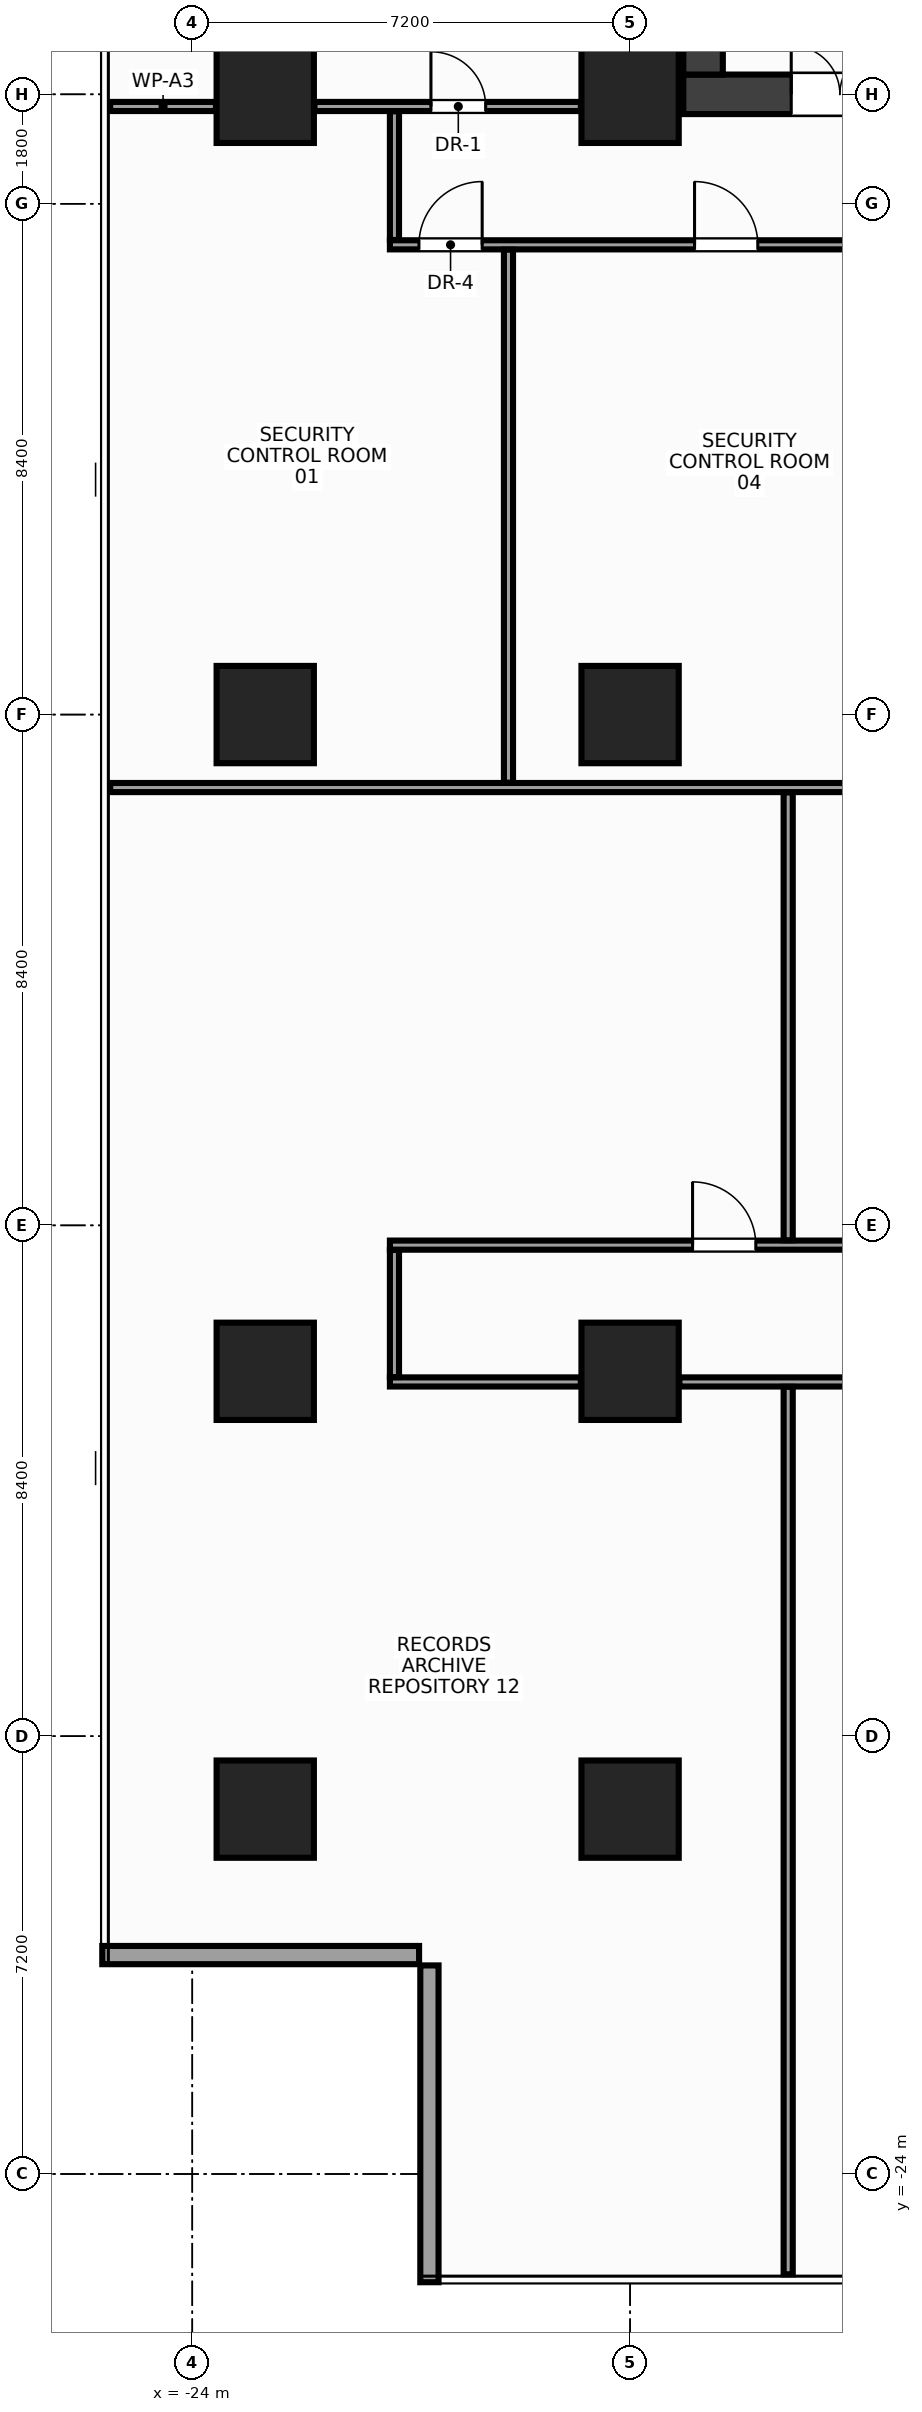
"""IFC4 building model, lengths in metres.
Left out: names, types, materials, properties, quantities, classifications, styles, units other than length and angle.
Written with IfcOpenShell. Run it as: python <this file> out.ifc"""

import sys

from ifc_helpers import new_model, si_unit, direction, frame, frame_2d, origin, origin_2d, place, context, subcontext, project, spatial, rectangle, extrude, source, transform, mapped, element, fill, save


model = new_model("IFC4")
c1 = context("Model", 3, precision=1e-05, world=origin(), true_north=direction((0.0, 1.0)))
c2 = subcontext(c1, "Body", "Model", "MODEL_VIEW")
j1 = project(units=[si_unit("LENGTHUNIT", "METRE"), si_unit("PLANEANGLEUNIT", "RADIAN")], contexts=[c1])
p1 = place(None, origin())
s1 = spatial("IfcSite", under=j1, at=p1, CompositionType="ELEMENT")
p2 = place(p1, origin())
s2 = spatial("IfcBuilding", under=s1, at=p2, CompositionType="ELEMENT")
p3 = place(p2, frame((0.0, 0.0, 95.6)))
s3 = spatial("IfcBuildingStorey", under=s2, at=p3, CompositionType="ELEMENT", Elevation=95.6)
m1 = source(origin(), c2, "Body", "SweptSolid", [
    extrude(rectangle(XDim=31.85, YDim=0.65, at=frame_2d((15.925, 0.0))), origin(), (0.0, 0.0, 1.0), 3.6),
])
p4 = place(p3, frame((-15.925, 10.2, 0.0), z_axis=(0.0, 0.0, 1.0), x_axis=(1.0, 0.0, 0.0)))
e1 = element("IfcWall", 1, at=p4, inside=s3, PredefinedType="SHEAR", context=c2, shape_type="MappedRepresentation", body=[
    mapped(m1, transform((0.0, 0.0, 0.0), x_axis=(1.0, 0.0, 0.0), y_axis=(0.0, 1.0, 0.0), z_axis=(0.0, 0.0, 1.0), scale=1.0)),
])
p5 = place(p4, frame((1.775, 0.0, 0.0)))
e2 = element("IfcOpeningElement", 2, at=p5, cuts=e1, PredefinedType="OPENING", context=c2, shape_type="SweptSolid", body=[
    extrude(rectangle(XDim=1.6, YDim=2.15, at=frame_2d((0.8, 1.075))), frame((0.0, 0.337, 0.0), z_axis=(0.0, -1.0, 0.0), x_axis=(1.0, 0.0, 0.0)), (0.0, 0.0, 1.0), 0.674),
])
p6 = place(p4, frame((28.475, 0.0, 0.0)))
e3 = element("IfcOpeningElement", 3, at=p6, cuts=e1, PredefinedType="OPENING", context=c2, shape_type="SweptSolid", body=[
    extrude(rectangle(XDim=1.6, YDim=2.15, at=frame_2d((0.8, 1.075))), frame((0.0, 0.337, 0.0), z_axis=(0.0, -1.0, 0.0), x_axis=(1.0, 0.0, 0.0)), (0.0, 0.0, 1.0), 0.674),
])
p7 = place(p4, frame((15.175, 0.0, 0.0)))
e4 = element("IfcOpeningElement", 4, at=p7, cuts=e1, PredefinedType="OPENING", context=c2, shape_type="SweptSolid", body=[
    extrude(rectangle(XDim=1.5, YDim=2.2, at=frame_2d((0.75, 1.1))), frame((0.0, 0.337, 0.0), z_axis=(0.0, -1.0, 0.0), x_axis=(1.0, 0.0, 0.0)), (0.0, 0.0, 1.0), 0.674),
])
m2 = source(origin(), c2, "Body", "SweptSolid", [
    extrude(rectangle(XDim=12.95, YDim=0.65, at=frame_2d((6.475, 0.0))), origin(), (0.0, 0.0, 1.0), 3.6),
])
p8 = place(p3, frame((-15.6, 10.525, 0.0), z_axis=(0.0, 0.0, 1.0), x_axis=(0.0, 1.0, 0.0)))
e5 = element("IfcWall", 5, at=p8, inside=s3, PredefinedType="SHEAR", context=c2, shape_type="MappedRepresentation", body=[
    mapped(m2, transform((0.0, 0.0, 0.0), x_axis=(1.0, 0.0, 0.0), y_axis=(0.0, 1.0, 0.0), z_axis=(0.0, 0.0, 1.0), scale=1.0)),
])
m3 = source(origin(), c2, "Body", "SweptSolid", [
    extrude(rectangle(XDim=1.6, YDim=1.6, at=origin_2d()), origin(), (0.0, 0.0, 1.0), 3.6),
])
for number, where, z_axis, x_axis in (
    (6, (-16.8, -18.0, 0.0), (0.0, 0.0, 1.0), (1.0, 0.0, 0.0)),
    (7, (-16.8, -10.8, 0.0), (0.0, 0.0, 1.0), (1.0, 0.0, 0.0)),
    (8, (-16.8, 0.0, 0.0), (0.0, 0.0, 1.0), (1.0, 0.0, 0.0)),
    (9, (-16.8, 10.2, 0.0), (0.0, 0.0, 1.0), (1.0, 0.0, 0.0)),
    (10, (-22.8, -18.0, 0.0), (0.0, 0.0, 1.0), (1.0, 0.0, 0.0)),
    (11, (-22.8, -10.8, 0.0), (0.0, 0.0, 1.0), (1.0, 0.0, 0.0)),
    (12, (-22.8, 0.0, 0.0), (0.0, 0.0, 1.0), (1.0, 0.0, 0.0)),
    (13, (-22.8, 10.2, 0.0), (0.0, 0.0, 1.0), (1.0, 0.0, 0.0)),
):
    element("IfcColumn", number, at=place(p3, frame(where, z_axis=z_axis, x_axis=x_axis)), inside=s3, PredefinedType="COLUMN", context=c2, shape_type="MappedRepresentation", body=[
        mapped(m3, transform((0.0, 0.0, 0.0), x_axis=(1.0, 0.0, 0.0), y_axis=(0.0, 1.0, 0.0), z_axis=(0.0, 0.0, 1.0), scale=1.0)),
    ])
m4 = source(origin(), c2, "Body", "SweptSolid", [
    extrude(rectangle(XDim=5.21, YDim=0.3, at=frame_2d((2.605, 0.0))), origin(), (0.0, 0.0, 1.0), 2.74),
])
for number, where, z_axis, x_axis in (
    (14, (-25.48, -20.4, 0.0), (0.0, 0.0, 1.0), (1.0, 0.0, 0.0)),
    (15, (-20.1, -20.57, 0.0), (0.0, 0.0, 1.0), (0.0, -1.0, 0.0)),
):
    element("IfcWall", number, at=place(p3, frame(where, z_axis=z_axis, x_axis=x_axis)), inside=s3, PredefinedType="STANDARD", context=c2, shape_type="MappedRepresentation", body=[
        mapped(m4, transform((0.0, 0.0, 0.0), x_axis=(1.0, 0.0, 0.0), y_axis=(0.0, 1.0, 0.0), z_axis=(0.0, 0.0, 1.0), scale=1.0)),
    ])
m5 = source(origin(), c2, "Body", "SweptSolid", [
    extrude(rectangle(XDim=1.74, YDim=0.15, at=frame_2d((0.87, 0.0))), origin(), (0.0, 0.0, 1.0), 3.36),
])
p9 = place(p3, frame((-25.35, 10.0, 0.0), z_axis=(0.0, 0.0, 1.0), x_axis=(1.0, 0.0, 0.0)))
e16 = element("IfcWall", 16, at=p9, inside=s3, PredefinedType="PARTITIONING", context=c2, shape_type="MappedRepresentation", body=[
    mapped(m5, transform((0.0, 0.0, 0.0), x_axis=(1.0, 0.0, 0.0), y_axis=(0.0, 1.0, 0.0), z_axis=(0.0, 0.0, 1.0), scale=1.0)),
])
m6 = source(origin(), c2, "Body", "SweptSolid", [
    extrude(rectangle(XDim=4.38, YDim=0.15, at=frame_2d((2.19, 0.0))), origin(), (0.0, 0.0, 1.0), 2.745),
])
p10 = place(p3, frame((-21.99, 10.0, 0.0), z_axis=(0.0, 0.0, 1.0), x_axis=(1.0, 0.0, 0.0)))
e17 = element("IfcWall", 17, at=p10, inside=s3, PredefinedType="PARTITIONING", context=c2, shape_type="MappedRepresentation", body=[
    mapped(m6, transform((0.0, 0.0, 0.0), x_axis=(1.0, 0.0, 0.0), y_axis=(0.0, 1.0, 0.0), z_axis=(0.0, 0.0, 1.0), scale=1.0)),
])
p11 = place(p10, frame((1.915, 0.0, 0.0)))
e18 = element("IfcOpeningElement", 18, at=p11, cuts=e17, PredefinedType="OPENING", context=c2, shape_type="SweptSolid", body=[
    extrude(rectangle(XDim=0.9, YDim=2.15, at=frame_2d((0.45, 1.075))), frame((0.0, 0.087, 0.0), z_axis=(0.0, -1.0, 0.0), x_axis=(1.0, 0.0, 0.0)), (0.0, 0.0, 1.0), 0.174),
])
m7 = source(origin(), c2, "Body", "SweptSolid", [
    extrude(rectangle(XDim=16.8, YDim=0.15, at=frame_2d((8.4, 0.0))), origin(), (0.0, 0.0, 1.0), 2.745),
])
p12 = place(p3, frame((-20.75, 7.725, 0.0), z_axis=(0.0, 0.0, 1.0), x_axis=(1.0, 0.0, 0.0)))
e19 = element("IfcWall", 19, at=p12, inside=s3, PredefinedType="PARTITIONING", context=c2, shape_type="MappedRepresentation", body=[
    mapped(m7, transform((0.0, 0.0, 0.0), x_axis=(1.0, 0.0, 0.0), y_axis=(0.0, 1.0, 0.0), z_axis=(0.0, 0.0, 1.0), scale=1.0)),
])
p13 = place(p12, frame((0.478, 0.0, 0.0)))
e20 = element("IfcOpeningElement", 20, at=p13, cuts=e19, PredefinedType="OPENING", context=c2, shape_type="SweptSolid", body=[
    extrude(rectangle(XDim=1.04, YDim=2.2, at=frame_2d((0.52, 1.1))), frame((0.0, 0.087, 0.0), z_axis=(0.0, -1.0, 0.0), x_axis=(1.0, 0.0, 0.0)), (0.0, 0.0, 1.0), 0.174),
])
p14 = place(p12, frame((5.01, 0.0, 0.0)))
e21 = element("IfcOpeningElement", 21, at=p14, cuts=e19, PredefinedType="OPENING", context=c2, shape_type="SweptSolid", body=[
    extrude(rectangle(XDim=1.04, YDim=2.2, at=frame_2d((0.52, 1.1))), frame((0.0, 0.087, 0.0), z_axis=(0.0, -1.0, 0.0), x_axis=(1.0, 0.0, 0.0)), (0.0, 0.0, 1.0), 0.174),
])
p15 = place(p12, frame((12.53, 0.0, 0.0)))
e22 = element("IfcOpeningElement", 22, at=p15, cuts=e19, PredefinedType="OPENING", context=c2, shape_type="SweptSolid", body=[
    extrude(rectangle(XDim=1.04, YDim=2.2, at=frame_2d((0.52, 1.1))), frame((0.0, 0.087, 0.0), z_axis=(0.0, -1.0, 0.0), x_axis=(1.0, 0.0, 0.0)), (0.0, 0.0, 1.0), 0.174),
])
p16 = place(p3, frame((-20.75, -8.725, 0.0), z_axis=(0.0, 0.0, 1.0), x_axis=(1.0, 0.0, 0.0)))
e23 = element("IfcWall", 23, at=p16, inside=s3, PredefinedType="PARTITIONING", context=c2, shape_type="MappedRepresentation", body=[
    mapped(m7, transform((0.0, 0.0, 0.0), x_axis=(1.0, 0.0, 0.0), y_axis=(0.0, 1.0, 0.0), z_axis=(0.0, 0.0, 1.0), scale=1.0)),
])
p17 = place(p16, frame((11.133, 0.0, 0.0)))
e24 = element("IfcOpeningElement", 24, at=p17, cuts=e23, PredefinedType="OPENING", context=c2, shape_type="SweptSolid", body=[
    extrude(rectangle(XDim=1.04, YDim=2.2, at=frame_2d((0.52, 1.1))), frame((0.0, 0.087, 0.0), z_axis=(0.0, -1.0, 0.0), x_axis=(1.0, 0.0, 0.0)), (0.0, 0.0, 1.0), 0.174),
])
p18 = place(p16, frame((4.978, 0.0, 0.0)))
e25 = element("IfcOpeningElement", 25, at=p18, cuts=e23, PredefinedType="OPENING", context=c2, shape_type="SweptSolid", body=[
    extrude(rectangle(XDim=1.04, YDim=2.2, at=frame_2d((0.52, 1.1))), frame((0.0, 0.087, 0.0), z_axis=(0.0, -1.0, 0.0), x_axis=(1.0, 0.0, 0.0)), (0.0, 0.0, 1.0), 0.174),
])
m8 = source(origin(), c2, "Body", "SweptSolid", [
    extrude(rectangle(XDim=3.14, YDim=0.15, at=frame_2d((1.57, 0.0))), origin(), (0.0, 0.0, 1.0), 2.745),
])
p19 = place(p3, frame((-20.75, -10.975, 0.0), z_axis=(0.0, 0.0, 1.0), x_axis=(1.0, 0.0, 0.0)))
e26 = element("IfcWall", 26, at=p19, inside=s3, PredefinedType="PARTITIONING", context=c2, shape_type="MappedRepresentation", body=[
    mapped(m8, transform((0.0, 0.0, 0.0), x_axis=(1.0, 0.0, 0.0), y_axis=(0.0, 1.0, 0.0), z_axis=(0.0, 0.0, 1.0), scale=1.0)),
])
m9 = source(origin(), c2, "Body", "SweptSolid", [
    extrude(rectangle(XDim=7.08, YDim=0.15, at=frame_2d((3.54, 0.0))), origin(), (0.0, 0.0, 1.0), 2.745),
])
p20 = place(p3, frame((-15.99, -10.975, 0.0), z_axis=(0.0, 0.0, 1.0), x_axis=(1.0, 0.0, 0.0)))
e27 = element("IfcWall", 27, at=p20, inside=s3, PredefinedType="PARTITIONING", context=c2, shape_type="MappedRepresentation", body=[
    mapped(m9, transform((0.0, 0.0, 0.0), x_axis=(1.0, 0.0, 0.0), y_axis=(0.0, 1.0, 0.0), z_axis=(0.0, 0.0, 1.0), scale=1.0)),
])
p21 = place(p20, frame((3.232, 0.0, 0.0)))
e28 = element("IfcOpeningElement", 28, at=p21, cuts=e27, PredefinedType="OPENING", context=c2, shape_type="SweptSolid", body=[
    extrude(rectangle(XDim=1.04, YDim=2.2, at=frame_2d((0.52, 1.1))), frame((0.0, 0.087, 0.0), z_axis=(0.0, -1.0, 0.0), x_axis=(1.0, 0.0, 0.0)), (0.0, 0.0, 1.0), 0.174),
])
m10 = source(origin(), c2, "Body", "SweptSolid", [
    extrude(rectangle(XDim=2.115, YDim=0.15, at=frame_2d((1.058, 0.0))), origin(), (0.0, 0.0, 1.0), 3.36),
])
p22 = place(p3, frame((-20.675, 7.805, 0.0), z_axis=(0.0, 0.0, 1.0), x_axis=(0.0, 1.0, 0.0)))
e29 = element("IfcWall", 29, at=p22, inside=s3, PredefinedType="PARTITIONING", context=c2, shape_type="MappedRepresentation", body=[
    mapped(m10, transform((0.0, 0.0, 0.0), x_axis=(1.0, 0.0, 0.0), y_axis=(0.0, 1.0, 0.0), z_axis=(0.0, 0.0, 1.0), scale=1.0)),
])
m11 = source(origin(), c2, "Body", "SweptSolid", [
    extrude(rectangle(XDim=2.09, YDim=0.15, at=frame_2d((1.045, 0.0))), origin(), (0.0, 0.0, 1.0), 3.36),
])
p23 = place(p3, frame((-20.675, -10.895, 0.0), z_axis=(0.0, 0.0, 1.0), x_axis=(0.0, 1.0, 0.0)))
e30 = element("IfcWall", 30, at=p23, inside=s3, PredefinedType="PARTITIONING", context=c2, shape_type="MappedRepresentation", body=[
    mapped(m11, transform((0.0, 0.0, 0.0), x_axis=(1.0, 0.0, 0.0), y_axis=(0.0, 1.0, 0.0), z_axis=(0.0, 0.0, 1.0), scale=1.0)),
])
m12 = source(origin(), c2, "Body", "SweptSolid", [
    extrude(rectangle(XDim=21.395, YDim=0.15, at=frame_2d((10.698, 0.0))), origin(), (0.0, 0.0, 1.0), 2.745),
])
p24 = place(p3, frame((-25.35, -1.2, 0.0), z_axis=(0.0, 0.0, 1.0), x_axis=(1.0, 0.0, 0.0)))
e31 = element("IfcWall", 31, at=p24, inside=s3, PredefinedType="PARTITIONING", context=c2, shape_type="MappedRepresentation", body=[
    mapped(m12, transform((0.0, 0.0, 0.0), x_axis=(1.0, 0.0, 0.0), y_axis=(0.0, 1.0, 0.0), z_axis=(0.0, 0.0, 1.0), scale=1.0)),
])
m13 = source(origin(), c2, "Body", "SweptSolid", [
    extrude(rectangle(XDim=8.765, YDim=0.15, at=frame_2d((4.383, 0.0))), origin(), (0.0, 0.0, 1.0), 2.745),
])
p25 = place(p3, frame((-18.8, -1.12, 0.0), z_axis=(0.0, 0.0, 1.0), x_axis=(0.0, 1.0, 0.0)))
e32 = element("IfcWall", 32, at=p25, inside=s3, PredefinedType="PARTITIONING", context=c2, shape_type="MappedRepresentation", body=[
    mapped(m13, transform((0.0, 0.0, 0.0), x_axis=(1.0, 0.0, 0.0), y_axis=(0.0, 1.0, 0.0), z_axis=(0.0, 0.0, 1.0), scale=1.0)),
])
m14 = source(origin(), c2, "Body", "SweptSolid", [
    extrude(rectangle(XDim=14.595, YDim=0.15, at=frame_2d((7.297, 0.0))), origin(), (0.0, 0.0, 1.0), 2.745),
])
p26 = place(p3, frame((-14.2, -25.65, 0.0), z_axis=(0.0, 0.0, 1.0), x_axis=(0.0, 1.0, 0.0)))
e33 = element("IfcWall", 33, at=p26, inside=s3, PredefinedType="PARTITIONING", context=c2, shape_type="MappedRepresentation", body=[
    mapped(m14, transform((0.0, 0.0, 0.0), x_axis=(1.0, 0.0, 0.0), y_axis=(0.0, 1.0, 0.0), z_axis=(0.0, 0.0, 1.0), scale=1.0)),
])
m15 = source(origin(), c2, "Body", "SweptSolid", [
    extrude(rectangle(XDim=7.365, YDim=0.15, at=frame_2d((3.683, 0.0))), origin(), (0.0, 0.0, 1.0), 3.36),
])
p27 = place(p3, frame((-14.2, -8.645, 0.0), z_axis=(0.0, 0.0, 1.0), x_axis=(0.0, 1.0, 0.0)))
e34 = element("IfcWall", 34, at=p27, inside=s3, PredefinedType="PARTITIONING", context=c2, shape_type="MappedRepresentation", body=[
    mapped(m15, transform((0.0, 0.0, 0.0), x_axis=(1.0, 0.0, 0.0), y_axis=(0.0, 1.0, 0.0), z_axis=(0.0, 0.0, 1.0), scale=1.0)),
])
m16 = source(origin(), c2, "Body", "SweptSolid", [
    extrude(rectangle(XDim=1.6, YDim=2.15, at=frame_2d((0.8, 1.075))), frame((0.0, 0.025, 0.0), z_axis=(0.0, -1.0, 0.0), x_axis=(1.0, 0.0, 0.0)), (0.0, 0.0, 1.0), 0.05),
])
p28 = place(p5, origin())
e35 = element("IfcDoor", 35, at=p28, inside=s3, OperationType="DOUBLE_DOOR_SINGLE_SWING", PredefinedType="DOOR", context=c2, shape_type="MappedRepresentation", body=[
    mapped(m16, transform((0.0, 0.0, 0.0), x_axis=(1.0, 0.0, 0.0), y_axis=(0.0, 1.0, 0.0), z_axis=(0.0, 0.0, 1.0), scale=1.0)),
])
fill(e2, e35)
m17 = source(origin(), c2, "Body", "SweptSolid", [
    extrude(rectangle(XDim=0.9, YDim=2.15, at=frame_2d((0.45, 1.075))), frame((0.0, 0.025, 0.0), z_axis=(0.0, -1.0, 0.0), x_axis=(1.0, 0.0, 0.0)), (0.0, 0.0, 1.0), 0.05),
])
p29 = place(p11, origin())
e36 = element("IfcDoor", 36, at=p29, inside=s3, OperationType="SINGLE_SWING_LEFT", PredefinedType="DOOR", context=c2, shape_type="MappedRepresentation", body=[
    mapped(m17, transform((0.0, 0.0, 0.0), x_axis=(1.0, 0.0, 0.0), y_axis=(0.0, 1.0, 0.0), z_axis=(0.0, 0.0, 1.0), scale=1.0)),
])
fill(e18, e36)
m18 = source(origin(), c2, "Body", "SweptSolid", [
    extrude(rectangle(XDim=1.04, YDim=2.2, at=frame_2d((0.52, 1.1))), frame((0.0, 0.025, 0.0), z_axis=(0.0, -1.0, 0.0), x_axis=(1.0, 0.0, 0.0)), (0.0, 0.0, 1.0), 0.05),
])
p30 = place(p13, origin())
e37 = element("IfcDoor", 37, at=p30, inside=s3, OperationType="SINGLE_SWING_RIGHT", PredefinedType="DOOR", context=c2, shape_type="MappedRepresentation", body=[
    mapped(m18, transform((0.0, 0.0, 0.0), x_axis=(1.0, 0.0, 0.0), y_axis=(0.0, 1.0, 0.0), z_axis=(0.0, 0.0, 1.0), scale=1.0)),
])
fill(e20, e37)
p31 = place(p14, origin())
e38 = element("IfcDoor", 38, at=p31, inside=s3, OperationType="SINGLE_SWING_LEFT", PredefinedType="DOOR", context=c2, shape_type="MappedRepresentation", body=[
    mapped(m18, transform((0.0, 0.0, 0.0), x_axis=(1.0, 0.0, 0.0), y_axis=(0.0, 1.0, 0.0), z_axis=(0.0, 0.0, 1.0), scale=1.0)),
])
fill(e21, e38)
p32 = place(p18, origin())
e39 = element("IfcDoor", 39, at=p32, inside=s3, OperationType="SINGLE_SWING_LEFT", PredefinedType="DOOR", context=c2, shape_type="MappedRepresentation", body=[
    mapped(m18, transform((0.0, 0.0, 0.0), x_axis=(1.0, 0.0, 0.0), y_axis=(0.0, 1.0, 0.0), z_axis=(0.0, 0.0, 1.0), scale=1.0)),
])
fill(e25, e39)
save(model, sys.argv[1])
